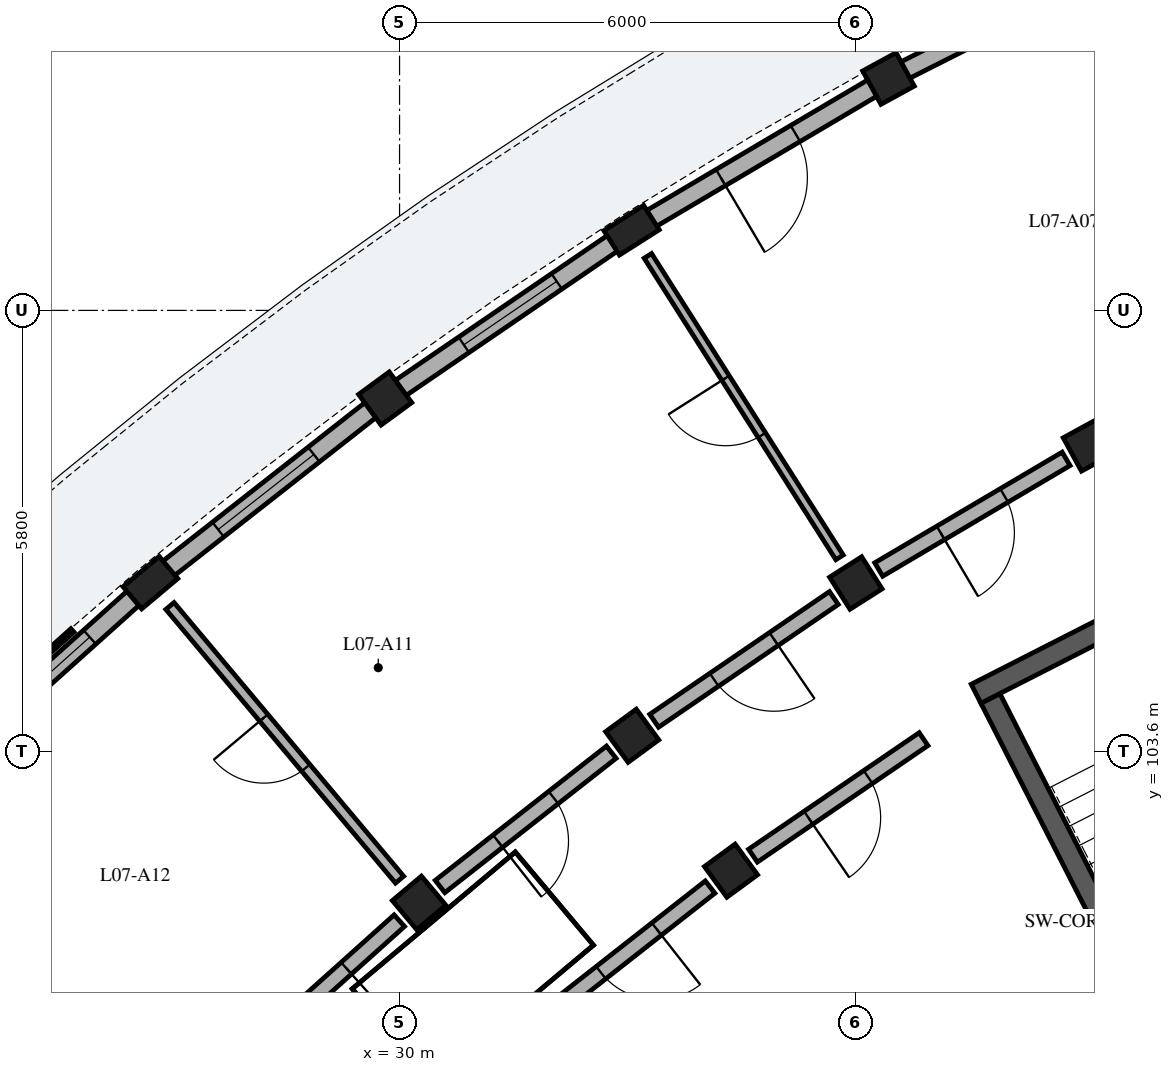
"""IFC4 building model, lengths in metres.
Left out: names, types, materials, properties, quantities, classifications, styles, units other than length and angle.
Written with IfcOpenShell. Run it as: python <this file> out.ifc"""

import sys

from ifc_helpers import new_model, si_unit, direction, frame, frame_2d, origin, origin_2d, place, context, subcontext, project, spatial, rectangle, extrude, element, fill, save


model = new_model("IFC4")
c1 = context("Model", 3, precision=1e-05, world=origin(), true_north=direction((0.0, 1.0)))
c2 = subcontext(c1, "Body", "Model", "MODEL_VIEW")
j1 = project(units=[si_unit("LENGTHUNIT", "METRE"), si_unit("PLANEANGLEUNIT", "RADIAN")], contexts=[c1])
p1 = place(None, origin())
s1 = spatial("IfcSite", under=j1, at=p1, CompositionType="ELEMENT")
p2 = place(p1, origin())
s2 = spatial("IfcBuilding", under=s1, at=p2, CompositionType="ELEMENT")
p3 = place(p2, frame((0.0, 0.0, 25.64)))
s3 = spatial("IfcBuildingStorey", under=s2, at=p3, CompositionType="ELEMENT", Elevation=25.64)
p4 = place(p3, frame((37.773, 104.296, 0.0), z_axis=(0.0, 0.0, 1.0), x_axis=(0.453992276384, -0.891005618941, 0.0)))
e1 = element("IfcWall", 1, at=p4, inside=s3, PredefinedType="SHEAR", context=c2, shape_type="SweptSolid", body=[
    extrude(rectangle(XDim=6.6, YDim=0.28, at=frame_2d((3.3, 0.0))), origin(), (0.0, 0.0, 1.0), 3.11),
])
p5 = place(p3, frame((37.585, 104.357, 0.0), z_axis=(0.0, 0.0, 1.0), x_axis=(0.891020222667, 0.453963613958, 0.0)))
e2 = element("IfcWall", 2, at=p5, inside=s3, PredefinedType="SHEAR", context=c2, shape_type="SweptSolid", body=[
    extrude(rectangle(XDim=3.48, YDim=0.28, at=frame_2d((1.74, 0.0))), origin(), (0.0, 0.0, 1.0), 3.11),
])
for number, where, z_axis, x_axis in (
    (3, (39.072, 107.625, 0.0), (0.0, 0.0, 1.0), (-0.48, 0.877, 0.0)),
    (4, (36.433, 112.451, 0.0), (0.0, 0.0, 1.0), (-0.48, 0.877, 0.0)),
    (5, (36.003, 105.813, 0.0), (0.0, 0.0, 1.0), (-0.536, 0.844, 0.0)),
):
    element("IfcColumn", number, at=place(p3, frame(where, z_axis=z_axis, x_axis=x_axis)), inside=s3, PredefinedType="COLUMN", context=c2, shape_type="SweptSolid", body=[
        extrude(rectangle(XDim=0.5, YDim=0.5, at=origin_2d()), origin(), (0.0, 0.0, 1.0), 3.11),
    ])
p6 = place(p3, frame((33.052, 110.455, 0.0), z_axis=(0.0, 0.0, 1.0), x_axis=(-0.536481603385, 0.843912015099, 0.0)))
e6 = element("IfcColumn", 6, at=p6, inside=s3, PredefinedType="PILASTER", context=c2, shape_type="SweptSolid", body=[
    extrude(rectangle(XDim=0.38, YDim=0.62, at=origin_2d()), origin(), (0.0, 0.0, 1.0), 3.11),
])
for number, where, z_axis, x_axis in (
    (7, (34.361, 102.029, 0.0), (0.0, 0.0, 1.0), (-0.591, 0.807, 0.0)),
    (8, (33.061, 103.804, 0.0), (0.0, 0.0, 1.0), (-0.591, 0.807, 0.0)),
    (9, (29.811, 108.241, 0.0), (0.0, 0.0, 1.0), (-0.591, 0.807, 0.0)),
    (10, (30.257, 101.605, 0.0), (0.0, 0.0, 1.0), (-0.643, 0.766, 0.0)),
):
    element("IfcColumn", number, at=place(p3, frame(where, z_axis=z_axis, x_axis=x_axis)), inside=s3, PredefinedType="COLUMN", context=c2, shape_type="SweptSolid", body=[
        extrude(rectangle(XDim=0.5, YDim=0.5, at=origin_2d()), origin(), (0.0, 0.0, 1.0), 3.11),
    ])
p7 = place(p3, frame((26.722, 105.818, 0.0), z_axis=(0.0, 0.0, 1.0), x_axis=(-0.642787636427, 0.766044420681, 0.0)))
e11 = element("IfcColumn", 11, at=p7, inside=s3, PredefinedType="PILASTER", context=c2, shape_type="SweptSolid", body=[
    extrude(rectangle(XDim=0.38, YDim=0.62, at=origin_2d()), origin(), (0.0, 0.0, 1.0), 3.11),
])
p8 = place(p3, frame((39.795, 114.147, 0.0), z_axis=(0.0, 0.0, 1.0), x_axis=(-0.892768574661, -0.450515562549, 0.0)))
e12 = element("IfcWall", 12, at=p8, inside=s3, PredefinedType="SOLIDWALL", context=c2, shape_type="SweptSolid", body=[
    extrude(rectangle(XDim=3.546, YDim=0.245, at=frame_2d((1.773, 0.0))), origin(), (0.0, 0.0, 1.0), 2.355),
])
p9 = place(p8, frame((1.153, 0.0, 0.55)))
e13 = element("IfcOpeningElement", 13, at=p9, cuts=e12, PredefinedType="OPENING", context=c2, shape_type="SweptSolid", body=[
    extrude(rectangle(XDim=1.24, YDim=1.535, at=frame_2d((0.62, 0.768))), frame((0.0, 0.133, 0.0), z_axis=(0.0, -1.0, 0.0), x_axis=(1.0, 0.0, 0.0)), (0.0, 0.0, 1.0), 0.265),
])
p10 = place(p3, frame((36.244, 112.339, 0.0), z_axis=(0.0, 0.0, 1.0), x_axis=(-0.861152616304, -0.50834650725, 0.0)))
e14 = element("IfcWall", 14, at=p10, inside=s3, PredefinedType="SOLIDWALL", context=c2, shape_type="SweptSolid", body=[
    extrude(rectangle(XDim=3.546, YDim=0.245, at=frame_2d((1.773, 0.0))), origin(), (0.0, 0.0, 1.0), 2.355),
])
p11 = place(p10, frame((1.203, 0.0, 0.0)))
e15 = element("IfcOpeningElement", 15, at=p11, cuts=e14, PredefinedType="OPENING", context=c2, shape_type="SweptSolid", body=[
    extrude(rectangle(XDim=1.14, YDim=2.16, at=frame_2d((0.57, 1.08))), frame((0.0, 0.133, 0.0), z_axis=(0.0, -1.0, 0.0), x_axis=(1.0, 0.0, 0.0)), (0.0, 0.0, 1.0), 0.265),
])
p12 = place(p3, frame((32.92, 110.365, 0.0), z_axis=(0.0, 0.0, 1.0), x_axis=(-0.825779863852, -0.563992567732, 0.0)))
e16 = element("IfcWall", 16, at=p12, inside=s3, PredefinedType="SOLIDWALL", context=c2, shape_type="SweptSolid", body=[
    extrude(rectangle(XDim=3.546, YDim=0.245, at=frame_2d((1.773, 0.0))), origin(), (0.0, 0.0, 1.0), 2.355),
])
p13 = place(p12, frame((1.033, 0.0, 0.55)))
e17 = element("IfcOpeningElement", 17, at=p13, cuts=e16, PredefinedType="OPENING", context=c2, shape_type="SweptSolid", body=[
    extrude(rectangle(XDim=1.48, YDim=1.46, at=frame_2d((0.74, 0.73))), frame((0.0, 0.133, 0.0), z_axis=(0.0, -1.0, 0.0), x_axis=(1.0, 0.0, 0.0)), (0.0, 0.0, 1.0), 0.265),
])
p14 = place(p3, frame((29.638, 108.105, 0.0), z_axis=(0.0, 0.0, 1.0), x_axis=(-0.786831781174, -0.617167520317, 0.0)))
e18 = element("IfcWall", 18, at=p14, inside=s3, PredefinedType="SOLIDWALL", context=c2, shape_type="SweptSolid", body=[
    extrude(rectangle(XDim=3.546, YDim=0.245, at=frame_2d((1.773, 0.0))), origin(), (0.0, 0.0, 1.0), 2.355),
])
p15 = place(p14, frame((0.973, 0.0, 0.55)))
e19 = element("IfcOpeningElement", 19, at=p15, cuts=e18, PredefinedType="OPENING", context=c2, shape_type="SweptSolid", body=[
    extrude(rectangle(XDim=1.6, YDim=1.535, at=frame_2d((0.8, 0.768))), frame((0.0, 0.133, 0.0), z_axis=(0.0, -1.0, 0.0), x_axis=(1.0, 0.0, 0.0)), (0.0, 0.0, 1.0), 0.265),
])
p16 = place(p3, frame((26.603, 105.711, 0.0), z_axis=(0.0, 0.0, 1.0), x_axis=(-0.744419541982, -0.667712172658, 0.0)))
e20 = element("IfcWall", 20, at=p16, inside=s3, PredefinedType="SOLIDWALL", context=c2, shape_type="SweptSolid", body=[
    extrude(rectangle(XDim=3.546, YDim=0.245, at=frame_2d((1.773, 0.0))), origin(), (0.0, 0.0, 1.0), 2.355),
])
p17 = place(p16, frame((0.913, 0.0, 0.55)))
e21 = element("IfcOpeningElement", 21, at=p17, cuts=e20, PredefinedType="OPENING", context=c2, shape_type="SweptSolid", body=[
    extrude(rectangle(XDim=1.72, YDim=1.61, at=frame_2d((0.86, 0.805))), frame((0.0, 0.133, 0.0), z_axis=(0.0, -1.0, 0.0), x_axis=(1.0, 0.0, 0.0)), (0.0, 0.0, 1.0), 0.265),
])
p18 = place(p3, frame((38.77, 107.447, 0.0), z_axis=(0.0, 0.0, 1.0), x_axis=(-0.861113214678, -0.508413248753, 0.0)))
e22 = element("IfcWall", 22, at=p18, inside=s3, PredefinedType="PARTITIONING", context=c2, shape_type="SweptSolid", body=[
    extrude(rectangle(XDim=2.863, YDim=0.205, at=frame_2d((1.432, 0.0))), origin(), (0.0, 0.0, 1.0), 2.37),
])
p19 = place(p18, frame((0.947, 0.0, 0.0)))
e23 = element("IfcOpeningElement", 23, at=p19, cuts=e22, PredefinedType="OPENING", context=c2, shape_type="SweptSolid", body=[
    extrude(rectangle(XDim=0.97, YDim=2.15, at=frame_2d((0.485, 1.075))), frame((0.0, 0.113, 0.0), z_axis=(0.0, -1.0, 0.0), x_axis=(1.0, 0.0, 0.0)), (0.0, 0.0, 1.0), 0.225),
])
p20 = place(p3, frame((35.789, 106.151, 0.0), z_axis=(0.0, 0.0, 1.0), x_axis=(-0.536492262982, 0.843905238614, 0.0)))
e24 = element("IfcWall", 24, at=p20, inside=s3, PredefinedType="PARTITIONING", context=c2, shape_type="SweptSolid", body=[
    extrude(rectangle(XDim=4.7, YDim=0.115, at=frame_2d((2.35, 0.0))), origin(), (0.0, 0.0, 1.0), 2.37),
])
p21 = place(p20, frame((1.905, 0.0, 0.0)))
e25 = element("IfcOpeningElement", 25, at=p21, cuts=e24, PredefinedType="OPENING", context=c2, shape_type="SweptSolid", body=[
    extrude(rectangle(XDim=0.89, YDim=2.1, at=frame_2d((0.445, 1.05))), frame((0.0, 0.067, 0.0), z_axis=(0.0, -1.0, 0.0), x_axis=(1.0, 0.0, 0.0)), (0.0, 0.0, 1.0), 0.135),
])
p22 = place(p3, frame((35.714, 105.616, 0.0), z_axis=(0.0, 0.0, 1.0), x_axis=(-0.825779671787, -0.563992848947, 0.0)))
e26 = element("IfcWall", 26, at=p22, inside=s3, PredefinedType="PARTITIONING", context=c2, shape_type="SweptSolid", body=[
    extrude(rectangle(XDim=2.863, YDim=0.205, at=frame_2d((1.432, 0.0))), origin(), (0.0, 0.0, 1.0), 2.37),
])
p23 = place(p22, frame((0.957, 0.0, 0.0)))
e27 = element("IfcOpeningElement", 27, at=p23, cuts=e26, PredefinedType="OPENING", context=c2, shape_type="SweptSolid", body=[
    extrude(rectangle(XDim=0.95, YDim=2.13, at=frame_2d((0.475, 1.065))), frame((0.0, 0.113, 0.0), z_axis=(0.0, -1.0, 0.0), x_axis=(1.0, 0.0, 0.0)), (0.0, 0.0, 1.0), 0.225),
])
p24 = place(p3, frame((36.895, 103.76, 0.0), z_axis=(0.0, 0.0, 1.0), x_axis=(-0.825752009056, -0.56403334967, 0.0)))
e28 = element("IfcWall", 28, at=p24, inside=s3, PredefinedType="PARTITIONING", context=c2, shape_type="SweptSolid", body=[
    extrude(rectangle(XDim=2.718, YDim=0.205, at=frame_2d((1.359, 0.0))), origin(), (0.0, 0.0, 1.0), 2.37),
])
p25 = place(p24, frame((0.884, 0.0, 0.0)))
e29 = element("IfcOpeningElement", 29, at=p25, cuts=e28, PredefinedType="OPENING", context=c2, shape_type="SweptSolid", body=[
    extrude(rectangle(XDim=0.95, YDim=2.13, at=frame_2d((0.475, 1.065))), frame((0.0, 0.113, 0.0), z_axis=(0.0, -1.0, 0.0), x_axis=(1.0, 0.0, 0.0)), (0.0, 0.0, 1.0), 0.225),
])
p26 = place(p3, frame((32.785, 103.588, 0.0), z_axis=(0.0, 0.0, 1.0), x_axis=(-0.786806323554, -0.617199975061, 0.0)))
e30 = element("IfcWall", 30, at=p26, inside=s3, PredefinedType="PARTITIONING", context=c2, shape_type="SweptSolid", body=[
    extrude(rectangle(XDim=2.863, YDim=0.205, at=frame_2d((1.432, 0.0))), origin(), (0.0, 0.0, 1.0), 2.37),
])
p27 = place(p26, frame((0.967, 0.0, 0.0)))
e31 = element("IfcOpeningElement", 31, at=p27, cuts=e30, PredefinedType="OPENING", context=c2, shape_type="SweptSolid", body=[
    extrude(rectangle(XDim=0.93, YDim=2.12, at=frame_2d((0.465, 1.06))), frame((0.0, 0.113, 0.0), z_axis=(0.0, -1.0, 0.0), x_axis=(1.0, 0.0, 0.0)), (0.0, 0.0, 1.0), 0.225),
])
p28 = place(p3, frame((34.085, 101.813, 0.0), z_axis=(0.0, 0.0, 1.0), x_axis=(-0.786835457019, -0.617162833924, 0.0)))
e32 = element("IfcWall", 32, at=p28, inside=s3, PredefinedType="PARTITIONING", context=c2, shape_type="SweptSolid", body=[
    extrude(rectangle(XDim=2.718, YDim=0.205, at=frame_2d((1.359, 0.0))), origin(), (0.0, 0.0, 1.0), 2.37),
])
p29 = place(p28, frame((0.894, 0.0, 0.0)))
e33 = element("IfcOpeningElement", 33, at=p29, cuts=e32, PredefinedType="OPENING", context=c2, shape_type="SweptSolid", body=[
    extrude(rectangle(XDim=0.93, YDim=2.12, at=frame_2d((0.465, 1.06))), frame((0.0, 0.113, 0.0), z_axis=(0.0, -1.0, 0.0), x_axis=(1.0, 0.0, 0.0)), (0.0, 0.0, 1.0), 0.225),
])
p30 = place(p3, frame((30.0, 101.911, 0.0), z_axis=(0.0, 0.0, 1.0), x_axis=(-0.642811926223, 0.766024038465, 0.0)))
e34 = element("IfcWall", 34, at=p30, inside=s3, PredefinedType="PLUMBINGWALL", context=c2, shape_type="SweptSolid", body=[
    extrude(rectangle(XDim=4.7, YDim=0.14, at=frame_2d((2.35, 0.0))), origin(), (0.0, 0.0, 1.0), 2.37),
])
p31 = place(p30, frame((1.92, 0.0, 0.0)))
e35 = element("IfcOpeningElement", 35, at=p31, cuts=e34, PredefinedType="OPENING", context=c2, shape_type="SweptSolid", body=[
    extrude(rectangle(XDim=0.86, YDim=2.06, at=frame_2d((0.43, 1.03))), frame((0.0, 0.08, 0.0), z_axis=(0.0, -1.0, 0.0), x_axis=(1.0, 0.0, 0.0)), (0.0, 0.0, 1.0), 0.16),
])
p32 = place(p3, frame((29.997, 101.371, 0.0), z_axis=(0.0, 0.0, 1.0), x_axis=(-0.744433521088, -0.667696587291, 0.0)))
e36 = element("IfcWall", 36, at=p32, inside=s3, PredefinedType="PARTITIONING", context=c2, shape_type="SweptSolid", body=[
    extrude(rectangle(XDim=2.863, YDim=0.205, at=frame_2d((1.432, 0.0))), origin(), (0.0, 0.0, 1.0), 2.37),
])
p33 = place(p32, frame((0.937, 0.0, 0.0)))
e37 = element("IfcOpeningElement", 37, at=p33, cuts=e36, PredefinedType="OPENING", context=c2, shape_type="SweptSolid", body=[
    extrude(rectangle(XDim=0.99, YDim=2.16, at=frame_2d((0.495, 1.08))), frame((0.0, 0.113, 0.0), z_axis=(0.0, -1.0, 0.0), x_axis=(1.0, 0.0, 0.0)), (0.0, 0.0, 1.0), 0.225),
])
p34 = place(p11, origin())
e38 = element("IfcDoor", 38, at=p34, inside=s3, OperationType="SINGLE_SWING_RIGHT", PredefinedType="DOOR", context=c2, shape_type="SweptSolid", body=[
    extrude(rectangle(XDim=1.14, YDim=2.16, at=frame_2d((0.57, 1.08))), frame((0.0, 0.025, 0.0), z_axis=(0.0, -1.0, 0.0), x_axis=(1.0, 0.0, 0.0)), (0.0, 0.0, 1.0), 0.05),
])
fill(e15, e38)
p35 = place(p13, origin())
e39 = element("IfcWindow", 39, at=p35, inside=s3, PartitioningType="SINGLE_PANEL", PredefinedType="WINDOW", context=c2, shape_type="SweptSolid", body=[
    extrude(rectangle(XDim=1.48, YDim=1.46, at=frame_2d((0.74, 0.73))), frame((0.0, 0.03, 0.0), z_axis=(0.0, -1.0, 0.0), x_axis=(1.0, 0.0, 0.0)), (0.0, 0.0, 1.0), 0.06),
])
fill(e17, e39)
p36 = place(p15, origin())
e40 = element("IfcWindow", 40, at=p36, inside=s3, PartitioningType="SINGLE_PANEL", PredefinedType="WINDOW", context=c2, shape_type="SweptSolid", body=[
    extrude(rectangle(XDim=1.6, YDim=1.535, at=frame_2d((0.8, 0.768))), frame((0.0, 0.03, 0.0), z_axis=(0.0, -1.0, 0.0), x_axis=(1.0, 0.0, 0.0)), (0.0, 0.0, 1.0), 0.06),
])
fill(e19, e40)
p37 = place(p17, origin())
e41 = element("IfcWindow", 41, at=p37, inside=s3, PartitioningType="SINGLE_PANEL", PredefinedType="WINDOW", context=c2, shape_type="SweptSolid", body=[
    extrude(rectangle(XDim=1.72, YDim=1.61, at=frame_2d((0.86, 0.805))), frame((0.0, 0.03, 0.0), z_axis=(0.0, -1.0, 0.0), x_axis=(1.0, 0.0, 0.0)), (0.0, 0.0, 1.0), 0.06),
])
fill(e21, e41)
p38 = place(p19, origin())
e42 = element("IfcDoor", 42, at=p38, inside=s3, OperationType="SINGLE_SWING_RIGHT", PredefinedType="DOOR", context=c2, shape_type="SweptSolid", body=[
    extrude(rectangle(XDim=0.97, YDim=2.15, at=frame_2d((0.485, 1.075))), frame((0.0, 0.025, 0.0), z_axis=(0.0, -1.0, 0.0), x_axis=(1.0, 0.0, 0.0)), (0.0, 0.0, 1.0), 0.05),
])
fill(e23, e42)
p39 = place(p21, origin())
e43 = element("IfcDoor", 43, at=p39, inside=s3, OperationType="SINGLE_SWING_RIGHT", PredefinedType="DOOR", context=c2, shape_type="SweptSolid", body=[
    extrude(rectangle(XDim=0.89, YDim=2.1, at=frame_2d((0.445, 1.05))), frame((0.0, 0.025, 0.0), z_axis=(0.0, -1.0, 0.0), x_axis=(1.0, 0.0, 0.0)), (0.0, 0.0, 1.0), 0.05),
])
fill(e25, e43)
p40 = place(p23, origin())
e44 = element("IfcDoor", 44, at=p40, inside=s3, OperationType="SINGLE_SWING_LEFT", PredefinedType="DOOR", context=c2, shape_type="SweptSolid", body=[
    extrude(rectangle(XDim=0.95, YDim=2.13, at=frame_2d((0.475, 1.065))), frame((0.0, 0.025, 0.0), z_axis=(0.0, -1.0, 0.0), x_axis=(1.0, 0.0, 0.0)), (0.0, 0.0, 1.0), 0.05),
])
fill(e27, e44)
p41 = place(p25, origin())
e45 = element("IfcDoor", 45, at=p41, inside=s3, OperationType="SINGLE_SWING_RIGHT", PredefinedType="DOOR", context=c2, shape_type="SweptSolid", body=[
    extrude(rectangle(XDim=0.95, YDim=2.13, at=frame_2d((0.475, 1.065))), frame((0.0, 0.025, 0.0), z_axis=(0.0, -1.0, 0.0), x_axis=(1.0, 0.0, 0.0)), (0.0, 0.0, 1.0), 0.05),
])
fill(e29, e45)
p42 = place(p27, origin())
e46 = element("IfcDoor", 46, at=p42, inside=s3, OperationType="SINGLE_SWING_RIGHT", PredefinedType="DOOR", context=c2, shape_type="SweptSolid", body=[
    extrude(rectangle(XDim=0.93, YDim=2.12, at=frame_2d((0.465, 1.06))), frame((0.0, 0.025, 0.0), z_axis=(0.0, -1.0, 0.0), x_axis=(1.0, 0.0, 0.0)), (0.0, 0.0, 1.0), 0.05),
])
fill(e31, e46)
p43 = place(p29, origin())
e47 = element("IfcDoor", 47, at=p43, inside=s3, OperationType="SINGLE_SWING_LEFT", PredefinedType="DOOR", context=c2, shape_type="SweptSolid", body=[
    extrude(rectangle(XDim=0.93, YDim=2.12, at=frame_2d((0.465, 1.06))), frame((0.0, 0.025, 0.0), z_axis=(0.0, -1.0, 0.0), x_axis=(1.0, 0.0, 0.0)), (0.0, 0.0, 1.0), 0.05),
])
fill(e33, e47)
p44 = place(p31, origin())
e48 = element("IfcDoor", 48, at=p44, inside=s3, OperationType="SINGLE_SWING_RIGHT", PredefinedType="DOOR", context=c2, shape_type="SweptSolid", body=[
    extrude(rectangle(XDim=0.86, YDim=2.06, at=frame_2d((0.43, 1.03))), frame((0.0, 0.025, 0.0), z_axis=(0.0, -1.0, 0.0), x_axis=(1.0, 0.0, 0.0)), (0.0, 0.0, 1.0), 0.05),
])
fill(e35, e48)
p45 = place(p33, origin())
e49 = element("IfcDoor", 49, at=p45, inside=s3, OperationType="SINGLE_SWING_LEFT", PredefinedType="DOOR", context=c2, shape_type="SweptSolid", body=[
    extrude(rectangle(XDim=0.99, YDim=2.16, at=frame_2d((0.495, 1.08))), frame((0.0, 0.025, 0.0), z_axis=(0.0, -1.0, 0.0), x_axis=(1.0, 0.0, 0.0)), (0.0, 0.0, 1.0), 0.05),
])
fill(e37, e49)
save(model, sys.argv[1])
